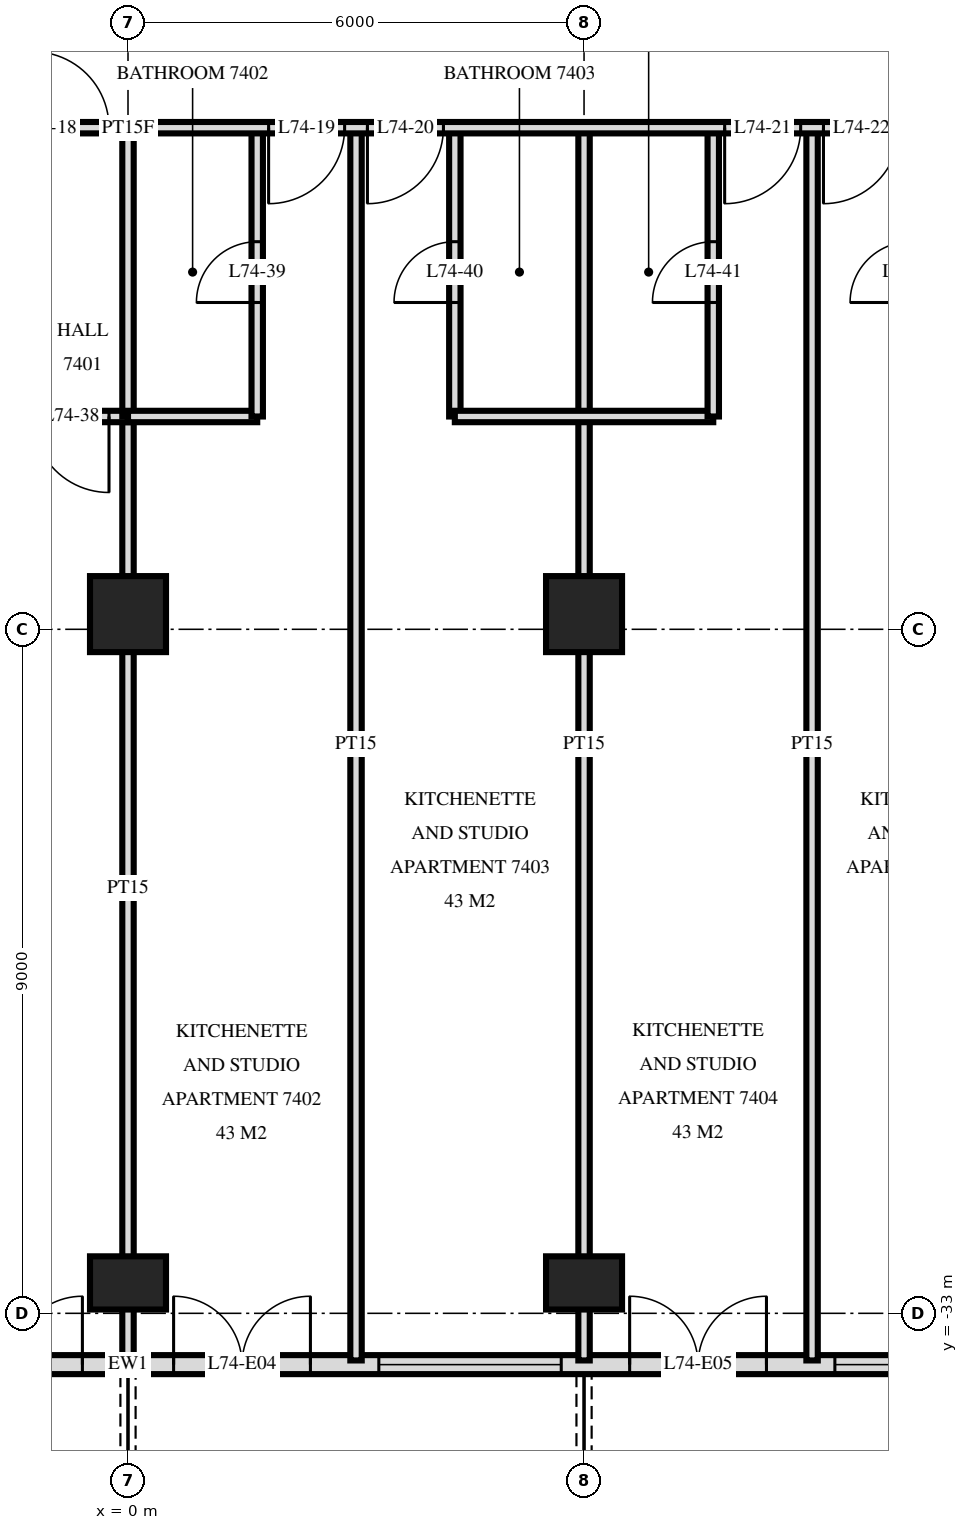
"""IFC4 building model, lengths in metres.
Left out: names, types, materials, properties, quantities, classifications, styles, units other than length and angle.
Written with IfcOpenShell. Run it as: python <this file> out.ifc"""

import sys

from ifc_helpers import new_model, si_unit, direction, frame, frame_2d, origin, origin_2d, place, context, subcontext, project, spatial, rectangle, extrude, element, fill, save


model = new_model("IFC4")
c1 = context("Model", 3, precision=1e-05, world=origin(), true_north=direction((0.0, 1.0)))
c2 = subcontext(c1, "Body", "Model", "MODEL_VIEW")
j1 = project(units=[si_unit("LENGTHUNIT", "METRE"), si_unit("PLANEANGLEUNIT", "RADIAN")], contexts=[c1])
p1 = place(None, origin())
s1 = spatial("IfcSite", under=j1, at=p1, CompositionType="ELEMENT")
p2 = place(p1, origin())
s2 = spatial("IfcBuilding", under=s1, at=p2, CompositionType="ELEMENT")
p3 = place(p2, frame((0.0, 0.0, 280.6)))
s3 = spatial("IfcBuildingStorey", under=s2, at=p3, CompositionType="ELEMENT", Elevation=280.6)
p4 = place(p3, frame((0.0, -32.6, 0.0), z_axis=(0.0, 0.0, 1.0), x_axis=(1.0, 0.0, 0.0)))
e1 = element("IfcColumn", 1, at=p4, inside=s3, PredefinedType="COLUMN", context=c2, shape_type="SweptSolid", body=[
    extrude(rectangle(XDim=1.0, YDim=0.7, at=origin_2d()), origin(), (0.0, 0.0, 1.0), 3.5),
])
p5 = place(p3, frame((0.0, -23.8, 0.0), z_axis=(0.0, 0.0, 1.0), x_axis=(1.0, 0.0, 0.0)))
e2 = element("IfcColumn", 2, at=p5, inside=s3, PredefinedType="COLUMN", context=c2, shape_type="SweptSolid", body=[
    extrude(rectangle(XDim=1.0, YDim=1.0, at=origin_2d()), origin(), (0.0, 0.0, 1.0), 3.5),
])
p6 = place(p3, frame((6.0, -32.6, 0.0), z_axis=(0.0, 0.0, 1.0), x_axis=(1.0, 0.0, 0.0)))
e3 = element("IfcColumn", 3, at=p6, inside=s3, PredefinedType="COLUMN", context=c2, shape_type="SweptSolid", body=[
    extrude(rectangle(XDim=1.0, YDim=0.7, at=origin_2d()), origin(), (0.0, 0.0, 1.0), 3.5),
])
p7 = place(p3, frame((6.0, -23.8, 0.0), z_axis=(0.0, 0.0, 1.0), x_axis=(1.0, 0.0, 0.0)))
e4 = element("IfcColumn", 4, at=p7, inside=s3, PredefinedType="COLUMN", context=c2, shape_type="SweptSolid", body=[
    extrude(rectangle(XDim=1.0, YDim=1.0, at=origin_2d()), origin(), (0.0, 0.0, 1.0), 3.5),
])
p8 = place(p3, frame((-18.575, -33.675, 0.0), z_axis=(0.0, 0.0, 1.0), x_axis=(1.0, 0.0, 0.0)))
e5 = element("IfcWall", 5, at=p8, inside=s3, PredefinedType="SOLIDWALL", context=c2, shape_type="SweptSolid", body=[
    extrude(rectangle(XDim=37.151, YDim=0.25, at=frame_2d((18.575, 0.0))), origin(), (0.0, 0.0, 1.0), 3.22),
])
p9 = place(p8, frame((4.175, 0.0, 0.0)))
e6 = element("IfcOpeningElement", 6, at=p9, cuts=e5, PredefinedType="OPENING", context=c2, shape_type="SweptSolid", body=[
    extrude(rectangle(XDim=1.8, YDim=2.4, at=frame_2d((0.9, 1.2))), frame((0.0, 0.135, 0.0), z_axis=(0.0, -1.0, 0.0), x_axis=(1.0, 0.0, 0.0)), (0.0, 0.0, 1.0), 0.27),
])
p10 = place(p8, frame((7.512, 0.0, 0.0)))
e7 = element("IfcOpeningElement", 7, at=p10, cuts=e5, PredefinedType="OPENING", context=c2, shape_type="SweptSolid", body=[
    extrude(rectangle(XDim=1.8, YDim=2.4, at=frame_2d((0.9, 1.2))), frame((0.0, 0.135, 0.0), z_axis=(0.0, -1.0, 0.0), x_axis=(1.0, 0.0, 0.0)), (0.0, 0.0, 1.0), 0.27),
])
p11 = place(p8, frame((10.287, 0.0, 0.9)))
e8 = element("IfcOpeningElement", 8, at=p11, cuts=e5, PredefinedType="OPENING", context=c2, shape_type="SweptSolid", body=[
    extrude(rectangle(XDim=1.8, YDim=1.5, at=frame_2d((0.9, 0.75))), frame((0.0, 0.135, 0.0), z_axis=(0.0, -1.0, 0.0), x_axis=(1.0, 0.0, 0.0)), (0.0, 0.0, 1.0), 0.27),
])
p12 = place(p8, frame((12.875, 0.0, 0.9)))
e9 = element("IfcOpeningElement", 9, at=p12, cuts=e5, PredefinedType="OPENING", context=c2, shape_type="SweptSolid", body=[
    extrude(rectangle(XDim=2.4, YDim=1.5, at=frame_2d((1.2, 0.75))), frame((0.0, 0.135, 0.0), z_axis=(0.0, -1.0, 0.0), x_axis=(1.0, 0.0, 0.0)), (0.0, 0.0, 1.0), 0.27),
])
p13 = place(p8, frame((16.175, 0.0, 0.0)))
e10 = element("IfcOpeningElement", 10, at=p13, cuts=e5, PredefinedType="OPENING", context=c2, shape_type="SweptSolid", body=[
    extrude(rectangle(XDim=1.8, YDim=2.4, at=frame_2d((0.9, 1.2))), frame((0.0, 0.135, 0.0), z_axis=(0.0, -1.0, 0.0), x_axis=(1.0, 0.0, 0.0)), (0.0, 0.0, 1.0), 0.27),
])
p14 = place(p8, frame((19.175, 0.0, 0.0)))
e11 = element("IfcOpeningElement", 11, at=p14, cuts=e5, PredefinedType="OPENING", context=c2, shape_type="SweptSolid", body=[
    extrude(rectangle(XDim=1.8, YDim=2.4, at=frame_2d((0.9, 1.2))), frame((0.0, 0.135, 0.0), z_axis=(0.0, -1.0, 0.0), x_axis=(1.0, 0.0, 0.0)), (0.0, 0.0, 1.0), 0.27),
])
p15 = place(p8, frame((21.875, 0.0, 0.9)))
e12 = element("IfcOpeningElement", 12, at=p15, cuts=e5, PredefinedType="OPENING", context=c2, shape_type="SweptSolid", body=[
    extrude(rectangle(XDim=2.4, YDim=1.5, at=frame_2d((1.2, 0.75))), frame((0.0, 0.135, 0.0), z_axis=(0.0, -1.0, 0.0), x_axis=(1.0, 0.0, 0.0)), (0.0, 0.0, 1.0), 0.27),
])
p16 = place(p8, frame((25.175, 0.0, 0.0)))
e13 = element("IfcOpeningElement", 13, at=p16, cuts=e5, PredefinedType="OPENING", context=c2, shape_type="SweptSolid", body=[
    extrude(rectangle(XDim=1.8, YDim=2.4, at=frame_2d((0.9, 1.2))), frame((0.0, 0.135, 0.0), z_axis=(0.0, -1.0, 0.0), x_axis=(1.0, 0.0, 0.0)), (0.0, 0.0, 1.0), 0.27),
])
p17 = place(p8, frame((27.875, 0.0, 0.9)))
e14 = element("IfcOpeningElement", 14, at=p17, cuts=e5, PredefinedType="OPENING", context=c2, shape_type="SweptSolid", body=[
    extrude(rectangle(XDim=2.4, YDim=1.5, at=frame_2d((1.2, 0.75))), frame((0.0, 0.135, 0.0), z_axis=(0.0, -1.0, 0.0), x_axis=(1.0, 0.0, 0.0)), (0.0, 0.0, 1.0), 0.27),
])
p18 = place(p8, frame((30.95, 0.0, 0.9)))
e15 = element("IfcOpeningElement", 15, at=p18, cuts=e5, PredefinedType="OPENING", context=c2, shape_type="SweptSolid", body=[
    extrude(rectangle(XDim=1.8, YDim=1.5, at=frame_2d((0.9, 0.75))), frame((0.0, 0.135, 0.0), z_axis=(0.0, -1.0, 0.0), x_axis=(1.0, 0.0, 0.0)), (0.0, 0.0, 1.0), 0.27),
])
p19 = place(p8, frame((34.175, 0.0, 0.0)))
e16 = element("IfcOpeningElement", 16, at=p19, cuts=e5, PredefinedType="OPENING", context=c2, shape_type="SweptSolid", body=[
    extrude(rectangle(XDim=1.8, YDim=2.4, at=frame_2d((0.9, 1.2))), frame((0.0, 0.135, 0.0), z_axis=(0.0, -1.0, 0.0), x_axis=(1.0, 0.0, 0.0)), (0.0, 0.0, 1.0), 0.27),
])
p20 = place(p3, frame((9.0, -33.62, 0.0), z_axis=(0.0, 0.0, 1.0), x_axis=(0.0, 1.0, 0.0)))
e17 = element("IfcWall", 17, at=p20, inside=s3, PredefinedType="PARTITIONING", context=c2, shape_type="SweptSolid", body=[
    extrude(rectangle(XDim=16.22, YDim=0.15, at=frame_2d((8.11, 0.0))), origin(), (0.0, 0.0, 1.0), 3.22),
])
p21 = place(p3, frame((7.7, -21.2, 0.0), z_axis=(0.0, 0.0, 1.0), x_axis=(0.0, 1.0, 0.0)))
e18 = element("IfcWall", 18, at=p21, inside=s3, PredefinedType="PARTITIONING", context=c2, shape_type="SweptSolid", body=[
    extrude(rectangle(XDim=3.8, YDim=0.15, at=frame_2d((1.9, 0.0))), origin(), (0.0, 0.0, 1.0), 3.22),
])
p22 = place(p21, frame((1.5, 0.0, 0.0)))
e19 = element("IfcOpeningElement", 19, at=p22, cuts=e18, PredefinedType="OPENING", context=c2, shape_type="SweptSolid", body=[
    extrude(rectangle(XDim=0.8, YDim=2.1, at=frame_2d((0.4, 1.05))), frame((0.0, 0.085, 0.0), z_axis=(0.0, -1.0, 0.0), x_axis=(1.0, 0.0, 0.0)), (0.0, 0.0, 1.0), 0.17),
])
p23 = place(p3, frame((6.0, -33.62, 0.0), z_axis=(0.0, 0.0, 1.0), x_axis=(0.0, 1.0, 0.0)))
e20 = element("IfcWall", 20, at=p23, inside=s3, PredefinedType="PARTITIONING", context=c2, shape_type="SweptSolid", body=[
    extrude(rectangle(XDim=16.22, YDim=0.15, at=frame_2d((8.11, 0.0))), origin(), (0.0, 0.0, 1.0), 3.22),
])
p24 = place(p3, frame((4.3, -21.2, 0.0), z_axis=(0.0, 0.0, 1.0), x_axis=(0.0, 1.0, 0.0)))
e21 = element("IfcWall", 21, at=p24, inside=s3, PredefinedType="PARTITIONING", context=c2, shape_type="SweptSolid", body=[
    extrude(rectangle(XDim=3.8, YDim=0.15, at=frame_2d((1.9, 0.0))), origin(), (0.0, 0.0, 1.0), 3.22),
])
p25 = place(p24, frame((1.5, 0.0, 0.0)))
e22 = element("IfcOpeningElement", 22, at=p25, cuts=e21, PredefinedType="OPENING", context=c2, shape_type="SweptSolid", body=[
    extrude(rectangle(XDim=0.8, YDim=2.1, at=frame_2d((0.4, 1.05))), frame((0.0, 0.085, 0.0), z_axis=(0.0, -1.0, 0.0), x_axis=(1.0, 0.0, 0.0)), (0.0, 0.0, 1.0), 0.17),
])
p26 = place(p3, frame((3.0, -33.62, 0.0), z_axis=(0.0, 0.0, 1.0), x_axis=(0.0, 1.0, 0.0)))
e23 = element("IfcWall", 23, at=p26, inside=s3, PredefinedType="PARTITIONING", context=c2, shape_type="SweptSolid", body=[
    extrude(rectangle(XDim=16.22, YDim=0.15, at=frame_2d((8.11, 0.0))), origin(), (0.0, 0.0, 1.0), 3.22),
])
p27 = place(p3, frame((1.7, -21.2, 0.0), z_axis=(0.0, 0.0, 1.0), x_axis=(0.0, 1.0, 0.0)))
e24 = element("IfcWall", 24, at=p27, inside=s3, PredefinedType="PARTITIONING", context=c2, shape_type="SweptSolid", body=[
    extrude(rectangle(XDim=3.8, YDim=0.15, at=frame_2d((1.9, 0.0))), origin(), (0.0, 0.0, 1.0), 3.22),
])
p28 = place(p27, frame((1.5, 0.0, 0.0)))
e25 = element("IfcOpeningElement", 25, at=p28, cuts=e24, PredefinedType="OPENING", context=c2, shape_type="SweptSolid", body=[
    extrude(rectangle(XDim=0.8, YDim=2.1, at=frame_2d((0.4, 1.05))), frame((0.0, 0.085, 0.0), z_axis=(0.0, -1.0, 0.0), x_axis=(1.0, 0.0, 0.0)), (0.0, 0.0, 1.0), 0.17),
])
p29 = place(p3, frame((0.0, -21.2, 0.0), z_axis=(0.0, 0.0, 1.0), x_axis=(0.0, 1.0, 0.0)))
e26 = element("IfcWall", 26, at=p29, inside=s3, PredefinedType="PARTITIONING", context=c2, shape_type="SweptSolid", body=[
    extrude(rectangle(XDim=3.8, YDim=0.15, at=frame_2d((1.9, 0.0))), origin(), (0.0, 0.0, 1.0), 3.22),
])
p30 = place(p3, frame((0.0, -33.62, 0.0), z_axis=(0.0, 0.0, 1.0), x_axis=(0.0, 1.0, 0.0)))
e27 = element("IfcWall", 27, at=p30, inside=s3, PredefinedType="PARTITIONING", context=c2, shape_type="SweptSolid", body=[
    extrude(rectangle(XDim=12.42, YDim=0.15, at=frame_2d((6.21, 0.0))), origin(), (0.0, 0.0, 1.0), 3.22),
])
p31 = place(p3, frame((-1.5, -21.2, 0.0), z_axis=(0.0, 0.0, 1.0), x_axis=(1.0, 0.0, 0.0)))
e28 = element("IfcWall", 28, at=p31, inside=s3, PredefinedType="PARTITIONING", context=c2, shape_type="SweptSolid", body=[
    extrude(rectangle(XDim=1.5, YDim=0.15, at=frame_2d((0.75, 0.0))), origin(), (0.0, 0.0, 1.0), 3.22),
])
p32 = place(p31, frame((0.25, 0.0, 0.0)))
e29 = element("IfcOpeningElement", 29, at=p32, cuts=e28, PredefinedType="OPENING", context=c2, shape_type="SweptSolid", body=[
    extrude(rectangle(XDim=1.0, YDim=2.1, at=frame_2d((0.5, 1.05))), frame((0.0, 0.085, 0.0), z_axis=(0.0, -1.0, 0.0), x_axis=(1.0, 0.0, 0.0)), (0.0, 0.0, 1.0), 0.17),
])
p33 = place(p3, frame((0.0, -21.2, 0.0), z_axis=(0.0, 0.0, 1.0), x_axis=(1.0, 0.0, 0.0)))
e30 = element("IfcWall", 30, at=p33, inside=s3, PredefinedType="PARTITIONING", context=c2, shape_type="SweptSolid", body=[
    extrude(rectangle(XDim=1.7, YDim=0.15, at=frame_2d((0.85, 0.0))), origin(), (0.0, 0.0, 1.0), 3.22),
])
p34 = place(p3, frame((4.3, -21.2, 0.0), z_axis=(0.0, 0.0, 1.0), x_axis=(1.0, 0.0, 0.0)))
e31 = element("IfcWall", 31, at=p34, inside=s3, PredefinedType="PARTITIONING", context=c2, shape_type="SweptSolid", body=[
    extrude(rectangle(XDim=3.4, YDim=0.15, at=frame_2d((1.7, 0.0))), origin(), (0.0, 0.0, 1.0), 3.22),
])
p35 = place(p3, frame((-22.92, -17.4, 0.0), z_axis=(0.0, 0.0, 1.0), x_axis=(1.0, 0.0, 0.0)))
e32 = element("IfcWall", 32, at=p35, inside=s3, PredefinedType="PARTITIONING", context=c2, shape_type="SweptSolid", body=[
    extrude(rectangle(XDim=45.84, YDim=0.15, at=frame_2d((22.92, 0.0))), origin(), (0.0, 0.0, 1.0), 3.22),
])
p36 = place(p35, frame((21.67, 0.0, 0.0)))
e33 = element("IfcOpeningElement", 33, at=p36, cuts=e32, PredefinedType="OPENING", context=c2, shape_type="SweptSolid", body=[
    extrude(rectangle(XDim=1.0, YDim=2.1, at=frame_2d((0.5, 1.05))), frame((0.0, 0.085, 0.0), z_axis=(0.0, -1.0, 0.0), x_axis=(1.0, 0.0, 0.0)), (0.0, 0.0, 1.0), 0.17),
])
p37 = place(p35, frame((24.77, 0.0, 0.0)))
e34 = element("IfcOpeningElement", 34, at=p37, cuts=e32, PredefinedType="OPENING", context=c2, shape_type="SweptSolid", body=[
    extrude(rectangle(XDim=1.0, YDim=2.1, at=frame_2d((0.5, 1.05))), frame((0.0, 0.085, 0.0), z_axis=(0.0, -1.0, 0.0), x_axis=(1.0, 0.0, 0.0)), (0.0, 0.0, 1.0), 0.17),
])
p38 = place(p35, frame((26.07, 0.0, 0.0)))
e35 = element("IfcOpeningElement", 35, at=p38, cuts=e32, PredefinedType="OPENING", context=c2, shape_type="SweptSolid", body=[
    extrude(rectangle(XDim=1.0, YDim=2.1, at=frame_2d((0.5, 1.05))), frame((0.0, 0.085, 0.0), z_axis=(0.0, -1.0, 0.0), x_axis=(1.0, 0.0, 0.0)), (0.0, 0.0, 1.0), 0.17),
])
p39 = place(p35, frame((30.77, 0.0, 0.0)))
e36 = element("IfcOpeningElement", 36, at=p39, cuts=e32, PredefinedType="OPENING", context=c2, shape_type="SweptSolid", body=[
    extrude(rectangle(XDim=1.0, YDim=2.1, at=frame_2d((0.5, 1.05))), frame((0.0, 0.085, 0.0), z_axis=(0.0, -1.0, 0.0), x_axis=(1.0, 0.0, 0.0)), (0.0, 0.0, 1.0), 0.17),
])
p40 = place(p35, frame((32.07, 0.0, 0.0)))
e37 = element("IfcOpeningElement", 37, at=p40, cuts=e32, PredefinedType="OPENING", context=c2, shape_type="SweptSolid", body=[
    extrude(rectangle(XDim=1.0, YDim=2.1, at=frame_2d((0.5, 1.05))), frame((0.0, 0.085, 0.0), z_axis=(0.0, -1.0, 0.0), x_axis=(1.0, 0.0, 0.0)), (0.0, 0.0, 1.0), 0.17),
])
p41 = place(p35, frame((9.42, 0.0, 0.0)))
e38 = element("IfcOpeningElement", 38, at=p41, cuts=e32, PredefinedType="OPENING", context=c2, shape_type="SweptSolid", body=[
    extrude(rectangle(XDim=1.0, YDim=2.1, at=frame_2d((0.5, 1.05))), frame((0.0, 0.085, 0.0), z_axis=(0.0, -1.0, 0.0), x_axis=(1.0, 0.0, 0.0)), (0.0, 0.0, 1.0), 0.17),
])
p42 = place(p35, frame((2.67, 0.0, 0.0)))
e39 = element("IfcOpeningElement", 39, at=p42, cuts=e32, PredefinedType="OPENING", context=c2, shape_type="SweptSolid", body=[
    extrude(rectangle(XDim=1.0, YDim=2.1, at=frame_2d((0.5, 1.05))), frame((0.0, 0.085, 0.0), z_axis=(0.0, -1.0, 0.0), x_axis=(1.0, 0.0, 0.0)), (0.0, 0.0, 1.0), 0.17),
])
p43 = place(p35, frame((37.82, 0.0, 0.0)))
e40 = element("IfcOpeningElement", 40, at=p43, cuts=e32, PredefinedType="OPENING", context=c2, shape_type="SweptSolid", body=[
    extrude(rectangle(XDim=1.0, YDim=2.1, at=frame_2d((0.5, 1.05))), frame((0.0, 0.085, 0.0), z_axis=(0.0, -1.0, 0.0), x_axis=(1.0, 0.0, 0.0)), (0.0, 0.0, 1.0), 0.17),
])
p44 = place(p13, origin())
e41 = element("IfcDoor", 41, at=p44, inside=s3, OperationType="DOUBLE_DOOR_SINGLE_SWING", PredefinedType="DOOR", context=c2, shape_type="SweptSolid", body=[
    extrude(rectangle(XDim=1.8, YDim=2.4, at=frame_2d((0.9, 1.2))), frame((0.0, 0.025, 0.0), z_axis=(0.0, -1.0, 0.0), x_axis=(1.0, 0.0, 0.0)), (0.0, 0.0, 1.0), 0.05),
])
fill(e10, e41)
p45 = place(p14, origin())
e42 = element("IfcDoor", 42, at=p45, inside=s3, OperationType="DOUBLE_DOOR_SINGLE_SWING", PredefinedType="DOOR", context=c2, shape_type="SweptSolid", body=[
    extrude(rectangle(XDim=1.8, YDim=2.4, at=frame_2d((0.9, 1.2))), frame((0.0, 0.025, 0.0), z_axis=(0.0, -1.0, 0.0), x_axis=(1.0, 0.0, 0.0)), (0.0, 0.0, 1.0), 0.05),
])
fill(e11, e42)
p46 = place(p15, origin())
e43 = element("IfcWindow", 43, at=p46, inside=s3, PartitioningType="SINGLE_PANEL", PredefinedType="WINDOW", context=c2, shape_type="SweptSolid", body=[
    extrude(rectangle(XDim=2.4, YDim=1.5, at=frame_2d((1.2, 0.75))), frame((0.0, 0.03, 0.0), z_axis=(0.0, -1.0, 0.0), x_axis=(1.0, 0.0, 0.0)), (0.0, 0.0, 1.0), 0.06),
])
fill(e12, e43)
p47 = place(p16, origin())
e44 = element("IfcDoor", 44, at=p47, inside=s3, OperationType="DOUBLE_DOOR_SINGLE_SWING", PredefinedType="DOOR", context=c2, shape_type="SweptSolid", body=[
    extrude(rectangle(XDim=1.8, YDim=2.4, at=frame_2d((0.9, 1.2))), frame((0.0, 0.025, 0.0), z_axis=(0.0, -1.0, 0.0), x_axis=(1.0, 0.0, 0.0)), (0.0, 0.0, 1.0), 0.05),
])
fill(e13, e44)
p48 = place(p17, origin())
e45 = element("IfcWindow", 45, at=p48, inside=s3, PartitioningType="SINGLE_PANEL", PredefinedType="WINDOW", context=c2, shape_type="SweptSolid", body=[
    extrude(rectangle(XDim=2.4, YDim=1.5, at=frame_2d((1.2, 0.75))), frame((0.0, 0.03, 0.0), z_axis=(0.0, -1.0, 0.0), x_axis=(1.0, 0.0, 0.0)), (0.0, 0.0, 1.0), 0.06),
])
fill(e14, e45)
p49 = place(p36, origin())
e46 = element("IfcDoor", 46, at=p49, inside=s3, OperationType="SINGLE_SWING_RIGHT", PredefinedType="DOOR", context=c2, shape_type="SweptSolid", body=[
    extrude(rectangle(XDim=1.0, YDim=2.1, at=frame_2d((0.5, 1.05))), frame((0.0, 0.025, 0.0), z_axis=(0.0, -1.0, 0.0), x_axis=(1.0, 0.0, 0.0)), (0.0, 0.0, 1.0), 0.05),
])
fill(e33, e46)
p50 = place(p37, frame((0.5, 0.0, 0.0), z_axis=(0.0, 0.0, 1.0), x_axis=(-1.0, 0.0, 0.0)))
e47 = element("IfcDoor", 47, at=p50, inside=s3, OperationType="SINGLE_SWING_LEFT", PredefinedType="DOOR", context=c2, shape_type="SweptSolid", body=[
    extrude(rectangle(XDim=1.0, YDim=2.1, at=frame_2d((0.0, 1.05))), frame((0.0, -0.025, 0.0), z_axis=(0.0, 1.0, 0.0), x_axis=(-1.0, 0.0, 0.0)), (0.0, 0.0, 1.0), 0.05),
])
fill(e34, e47)
p51 = place(p38, frame((0.5, 0.0, 0.0), z_axis=(0.0, 0.0, 1.0), x_axis=(-1.0, 0.0, 0.0)))
e48 = element("IfcDoor", 48, at=p51, inside=s3, OperationType="SINGLE_SWING_LEFT", PredefinedType="DOOR", context=c2, shape_type="SweptSolid", body=[
    extrude(rectangle(XDim=1.0, YDim=2.1, at=frame_2d((0.0, 1.05))), frame((0.0, -0.025, 0.0), z_axis=(0.0, 1.0, 0.0), x_axis=(-1.0, 0.0, 0.0)), (0.0, 0.0, 1.0), 0.05),
])
fill(e35, e48)
p52 = place(p39, frame((0.5, 0.0, 0.0), z_axis=(0.0, 0.0, 1.0), x_axis=(-1.0, 0.0, 0.0)))
e49 = element("IfcDoor", 49, at=p52, inside=s3, OperationType="SINGLE_SWING_LEFT", PredefinedType="DOOR", context=c2, shape_type="SweptSolid", body=[
    extrude(rectangle(XDim=1.0, YDim=2.1, at=frame_2d((0.0, 1.05))), frame((0.0, -0.025, 0.0), z_axis=(0.0, 1.0, 0.0), x_axis=(-1.0, 0.0, 0.0)), (0.0, 0.0, 1.0), 0.05),
])
fill(e36, e49)
p53 = place(p40, frame((0.5, 0.0, 0.0), z_axis=(0.0, 0.0, 1.0), x_axis=(-1.0, 0.0, 0.0)))
e50 = element("IfcDoor", 50, at=p53, inside=s3, OperationType="SINGLE_SWING_LEFT", PredefinedType="DOOR", context=c2, shape_type="SweptSolid", body=[
    extrude(rectangle(XDim=1.0, YDim=2.1, at=frame_2d((0.0, 1.05))), frame((0.0, -0.025, 0.0), z_axis=(0.0, 1.0, 0.0), x_axis=(-1.0, 0.0, 0.0)), (0.0, 0.0, 1.0), 0.05),
])
fill(e37, e50)
p54 = place(p32, frame((0.5, 0.0, 0.0), z_axis=(0.0, 0.0, 1.0), x_axis=(-1.0, 0.0, 0.0)))
e51 = element("IfcDoor", 51, at=p54, inside=s3, OperationType="SINGLE_SWING_RIGHT", PredefinedType="DOOR", context=c2, shape_type="SweptSolid", body=[
    extrude(rectangle(XDim=1.0, YDim=2.1, at=frame_2d((0.0, 1.05))), frame((0.0, -0.025, 0.0), z_axis=(0.0, 1.0, 0.0), x_axis=(-1.0, 0.0, 0.0)), (0.0, 0.0, 1.0), 0.05),
])
fill(e29, e51)
p55 = place(p28, origin())
e52 = element("IfcDoor", 52, at=p55, inside=s3, OperationType="SINGLE_SWING_RIGHT", PredefinedType="DOOR", context=c2, shape_type="SweptSolid", body=[
    extrude(rectangle(XDim=0.8, YDim=2.1, at=frame_2d((0.4, 1.05))), frame((0.0, 0.025, 0.0), z_axis=(0.0, -1.0, 0.0), x_axis=(1.0, 0.0, 0.0)), (0.0, 0.0, 1.0), 0.05),
])
fill(e25, e52)
p56 = place(p25, origin())
e53 = element("IfcDoor", 53, at=p56, inside=s3, OperationType="SINGLE_SWING_RIGHT", PredefinedType="DOOR", context=c2, shape_type="SweptSolid", body=[
    extrude(rectangle(XDim=0.8, YDim=2.1, at=frame_2d((0.4, 1.05))), frame((0.0, 0.025, 0.0), z_axis=(0.0, -1.0, 0.0), x_axis=(1.0, 0.0, 0.0)), (0.0, 0.0, 1.0), 0.05),
])
fill(e22, e53)
p57 = place(p22, origin())
e54 = element("IfcDoor", 54, at=p57, inside=s3, OperationType="SINGLE_SWING_RIGHT", PredefinedType="DOOR", context=c2, shape_type="SweptSolid", body=[
    extrude(rectangle(XDim=0.8, YDim=2.1, at=frame_2d((0.4, 1.05))), frame((0.0, 0.025, 0.0), z_axis=(0.0, -1.0, 0.0), x_axis=(1.0, 0.0, 0.0)), (0.0, 0.0, 1.0), 0.05),
])
fill(e19, e54)
save(model, sys.argv[1])
